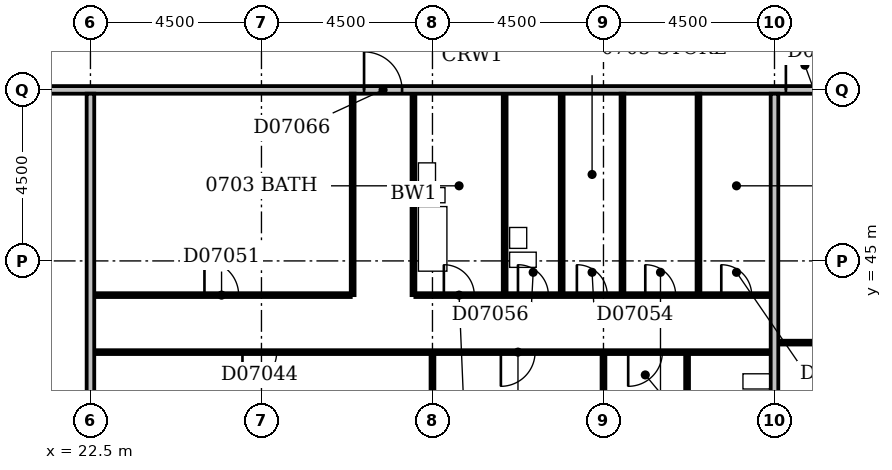
"""IFC4 building model, lengths in metres.
Left out: names, types, materials, properties, quantities, classifications, styles, units other than length and angle.
Written with IfcOpenShell. Run it as: python <this file> out.ifc"""

import sys

from ifc_helpers import new_model, si_unit, direction, frame, frame_2d, origin, place, context, subcontext, project, spatial, rectangle, extrude, element, fill, save


model = new_model("IFC4")
c1 = context("Model", 3, precision=1e-05, world=origin(), true_north=direction((0.0, 1.0)))
c2 = subcontext(c1, "Body", "Model", "MODEL_VIEW")
j1 = project(units=[si_unit("LENGTHUNIT", "METRE"), si_unit("PLANEANGLEUNIT", "RADIAN")], contexts=[c1])
p1 = place(None, origin())
s1 = spatial("IfcSite", under=j1, at=p1, CompositionType="ELEMENT")
p2 = place(p1, origin())
s2 = spatial("IfcBuilding", under=s1, at=p2, CompositionType="ELEMENT")
p3 = place(p2, frame((0.0, 0.0, 36.2)))
s3 = spatial("IfcBuildingStorey", under=s2, at=p3, CompositionType="ELEMENT", Elevation=36.2)
p4 = place(p3, frame((22.5, 36.6, 0.0), z_axis=(0.0, 0.0, 1.0), x_axis=(0.0, 1.0, 0.0)))
e1 = element("IfcWall", 1, at=p4, inside=s3, PredefinedType="PARTITIONING", context=c2, shape_type="SweptSolid", body=[
    extrude(rectangle(XDim=12.8, YDim=0.2, at=frame_2d((6.4, 0.0))), origin(), (0.0, 0.0, 1.0), 3.3),
])
p5 = place(p3, frame((31.5, 36.6, 0.0), z_axis=(0.0, 0.0, 1.0), x_axis=(0.0, 1.0, 0.0)))
e2 = element("IfcWall", 2, at=p5, inside=s3, PredefinedType="PARTITIONING", context=c2, shape_type="SweptSolid", body=[
    extrude(rectangle(XDim=5.95, YDim=0.1, at=frame_2d((2.975, 0.0))), origin(), (0.0, 0.0, 1.0), 3.3),
])
p6 = place(p3, frame((36.0, 36.6, 0.0), z_axis=(0.0, 0.0, 1.0), x_axis=(0.0, 1.0, 0.0)))
e3 = element("IfcWall", 3, at=p6, inside=s3, PredefinedType="PARTITIONING", context=c2, shape_type="SweptSolid", body=[
    extrude(rectangle(XDim=5.95, YDim=0.1, at=frame_2d((2.975, 0.0))), origin(), (0.0, 0.0, 1.0), 2.4),
])
p7 = place(p3, frame((40.5, 36.6, 0.0), z_axis=(0.0, 0.0, 1.0), x_axis=(0.0, 1.0, 0.0)))
e4 = element("IfcWall", 4, at=p7, inside=s3, PredefinedType="PARTITIONING", context=c2, shape_type="SweptSolid", body=[
    extrude(rectangle(XDim=12.8, YDim=0.2, at=frame_2d((6.4, 0.0))), origin(), (0.0, 0.0, 1.0), 3.3),
])
p8 = place(p3, frame((38.2, 39.7, 0.0), z_axis=(0.0, 0.0, 1.0), x_axis=(0.0, 1.0, 0.0)))
e5 = element("IfcWall", 5, at=p8, inside=s3, PredefinedType="PLUMBINGWALL", context=c2, shape_type="SweptSolid", body=[
    extrude(rectangle(XDim=2.85, YDim=0.1, at=frame_2d((1.425, 0.0))), origin(), (0.0, 0.0, 1.0), 3.3),
])
p9 = place(p8, frame((1.05, 0.0, 0.0)))
e6 = element("IfcOpeningElement", 6, at=p9, cuts=e5, PredefinedType="OPENING", context=c2, shape_type="SweptSolid", body=[
    extrude(rectangle(XDim=0.8, YDim=2.1, at=frame_2d((0.4, 1.05))), frame((0.0, 0.062, 0.0), z_axis=(0.0, -1.0, 0.0), x_axis=(1.0, 0.0, 0.0)), (0.0, 0.0, 1.0), 0.124),
])
p10 = place(p3, frame((22.6, 42.6, 0.0), z_axis=(0.0, 0.0, 1.0), x_axis=(1.0, 0.0, 0.0)))
e7 = element("IfcWall", 7, at=p10, inside=s3, PredefinedType="PARTITIONING", context=c2, shape_type="SweptSolid", body=[
    extrude(rectangle(XDim=17.8, YDim=0.1, at=frame_2d((8.9, 0.0))), origin(), (0.0, 0.0, 1.0), 3.3),
])
p11 = place(p10, frame((3.9, 0.0, 0.0)))
e8 = element("IfcOpeningElement", 8, at=p11, cuts=e7, PredefinedType="OPENING", context=c2, shape_type="SweptSolid", body=[
    extrude(rectangle(XDim=0.9, YDim=2.1, at=frame_2d((0.45, 1.05))), frame((0.0, 0.062, 0.0), z_axis=(0.0, -1.0, 0.0), x_axis=(1.0, 0.0, 0.0)), (0.0, 0.0, 1.0), 0.124),
])
p12 = place(p10, frame((10.7, 0.0, 0.0)))
e9 = element("IfcOpeningElement", 9, at=p12, cuts=e7, PredefinedType="OPENING", context=c2, shape_type="SweptSolid", body=[
    extrude(rectangle(XDim=0.9, YDim=2.1, at=frame_2d((0.45, 1.05))), frame((0.0, 0.062, 0.0), z_axis=(0.0, -1.0, 0.0), x_axis=(1.0, 0.0, 0.0)), (0.0, 0.0, 1.0), 0.124),
])
p13 = place(p10, frame((14.05, 0.0, 0.0)))
e10 = element("IfcOpeningElement", 10, at=p13, cuts=e7, PredefinedType="OPENING", context=c2, shape_type="SweptSolid", body=[
    extrude(rectangle(XDim=0.9, YDim=2.1, at=frame_2d((0.45, 1.05))), frame((0.0, 0.062, 0.0), z_axis=(0.0, -1.0, 0.0), x_axis=(1.0, 0.0, 0.0)), (0.0, 0.0, 1.0), 0.124),
])
p14 = place(p3, frame((40.6, 42.85, 0.0), z_axis=(0.0, 0.0, 1.0), x_axis=(1.0, 0.0, 0.0)))
e11 = element("IfcWall", 11, at=p14, inside=s3, PredefinedType="PARTITIONING", context=c2, shape_type="SweptSolid", body=[
    extrude(rectangle(XDim=13.3, YDim=0.1, at=frame_2d((6.65, 0.0))), origin(), (0.0, 0.0, 1.0), 3.3),
])
p15 = place(p14, frame((3.9, 0.0, 0.0)))
e12 = element("IfcOpeningElement", 12, at=p15, cuts=e11, PredefinedType="OPENING", context=c2, shape_type="SweptSolid", body=[
    extrude(rectangle(XDim=0.9, YDim=2.1, at=frame_2d((0.45, 1.05))), frame((0.0, 0.062, 0.0), z_axis=(0.0, -1.0, 0.0), x_axis=(1.0, 0.0, 0.0)), (0.0, 0.0, 1.0), 0.124),
])
p16 = place(p14, frame((10.7, 0.0, 0.0)))
e13 = element("IfcOpeningElement", 13, at=p16, cuts=e11, PredefinedType="OPENING", context=c2, shape_type="SweptSolid", body=[
    extrude(rectangle(XDim=0.9, YDim=2.1, at=frame_2d((0.45, 1.05))), frame((0.0, 0.062, 0.0), z_axis=(0.0, -1.0, 0.0), x_axis=(1.0, 0.0, 0.0)), (0.0, 0.0, 1.0), 0.124),
])
p17 = place(p3, frame((22.6, 44.1, 0.0), z_axis=(0.0, 0.0, 1.0), x_axis=(1.0, 0.0, 0.0)))
e14 = element("IfcWall", 14, at=p17, inside=s3, PredefinedType="PARTITIONING", context=c2, shape_type="SweptSolid", body=[
    extrude(rectangle(XDim=6.75, YDim=0.1, at=frame_2d((3.375, 0.0))), origin(), (0.0, 0.0, 1.0), 3.3),
])
p18 = place(p17, frame((2.9, 0.0, 0.0)))
e15 = element("IfcOpeningElement", 15, at=p18, cuts=e14, PredefinedType="OPENING", context=c2, shape_type="SweptSolid", body=[
    extrude(rectangle(XDim=0.9, YDim=2.1, at=frame_2d((0.45, 1.05))), frame((0.0, 0.062, 0.0), z_axis=(0.0, -1.0, 0.0), x_axis=(1.0, 0.0, 0.0)), (0.0, 0.0, 1.0), 0.124),
])
p19 = place(p3, frame((29.4, 44.1, 0.0), z_axis=(0.0, 0.0, 1.0), x_axis=(0.0, 1.0, 0.0)))
e16 = element("IfcWall", 16, at=p19, inside=s3, PredefinedType="PARTITIONING", context=c2, shape_type="SweptSolid", body=[
    extrude(rectangle(XDim=5.3, YDim=0.1, at=frame_2d((2.65, 0.0))), origin(), (0.0, 0.0, 1.0), 3.3),
])
p20 = place(p3, frame((31.0, 44.1, 0.0), z_axis=(0.0, 0.0, 1.0), x_axis=(0.0, 1.0, 0.0)))
e17 = element("IfcWall", 17, at=p20, inside=s3, PredefinedType="PLUMBINGWALL", context=c2, shape_type="SweptSolid", body=[
    extrude(rectangle(XDim=5.3, YDim=0.1, at=frame_2d((2.65, 0.0))), origin(), (0.0, 0.0, 1.0), 3.3),
])
p21 = place(p3, frame((31.05, 44.1, 0.0), z_axis=(0.0, 0.0, 1.0), x_axis=(1.0, 0.0, 0.0)))
e18 = element("IfcWall", 18, at=p21, inside=s3, PredefinedType="PARTITIONING", context=c2, shape_type="SweptSolid", body=[
    extrude(rectangle(XDim=9.35, YDim=0.1, at=frame_2d((4.675, 0.0))), origin(), (0.0, 0.0, 1.0), 3.3),
])
p22 = place(p21, frame((0.75, 0.0, 0.0)))
e19 = element("IfcOpeningElement", 19, at=p22, cuts=e18, PredefinedType="OPENING", context=c2, shape_type="SweptSolid", body=[
    extrude(rectangle(XDim=0.8, YDim=2.1, at=frame_2d((0.4, 1.05))), frame((0.0, 0.062, 0.0), z_axis=(0.0, -1.0, 0.0), x_axis=(1.0, 0.0, 0.0)), (0.0, 0.0, 1.0), 0.124),
])
p23 = place(p21, frame((8.05, 0.0, 0.0)))
e20 = element("IfcOpeningElement", 20, at=p23, cuts=e18, PredefinedType="OPENING", context=c2, shape_type="SweptSolid", body=[
    extrude(rectangle(XDim=0.8, YDim=2.1, at=frame_2d((0.4, 1.05))), frame((0.0, 0.062, 0.0), z_axis=(0.0, -1.0, 0.0), x_axis=(1.0, 0.0, 0.0)), (0.0, 0.0, 1.0), 0.124),
])
p24 = place(p21, frame((4.25, 0.0, 0.0)))
e21 = element("IfcOpeningElement", 21, at=p24, cuts=e18, PredefinedType="OPENING", context=c2, shape_type="SweptSolid", body=[
    extrude(rectangle(XDim=0.8, YDim=2.1, at=frame_2d((0.4, 1.05))), frame((0.0, 0.062, 0.0), z_axis=(0.0, -1.0, 0.0), x_axis=(1.0, 0.0, 0.0)), (0.0, 0.0, 1.0), 0.124),
])
p25 = place(p21, frame((6.05, 0.0, 0.0)))
e22 = element("IfcOpeningElement", 22, at=p25, cuts=e18, PredefinedType="OPENING", context=c2, shape_type="SweptSolid", body=[
    extrude(rectangle(XDim=0.8, YDim=2.1, at=frame_2d((0.4, 1.05))), frame((0.0, 0.062, 0.0), z_axis=(0.0, -1.0, 0.0), x_axis=(1.0, 0.0, 0.0)), (0.0, 0.0, 1.0), 0.124),
])
p26 = place(p21, frame((2.7, 0.0, 0.0)))
e23 = element("IfcOpeningElement", 23, at=p26, cuts=e18, PredefinedType="OPENING", context=c2, shape_type="SweptSolid", body=[
    extrude(rectangle(XDim=0.8, YDim=2.1, at=frame_2d((0.4, 1.05))), frame((0.0, 0.062, 0.0), z_axis=(0.0, -1.0, 0.0), x_axis=(1.0, 0.0, 0.0)), (0.0, 0.0, 1.0), 0.124),
])
for number, where, z_axis, x_axis in (
    (24, (33.4, 44.15, 0.0), (0.0, 0.0, 1.0), (0.0, 1.0, 0.0)),
    (25, (34.9, 44.15, 0.0), (0.0, 0.0, 1.0), (0.0, 1.0, 0.0)),
):
    element("IfcWall", number, at=place(p3, frame(where, z_axis=z_axis, x_axis=x_axis)), inside=s3, PredefinedType="PLUMBINGWALL", context=c2, shape_type="SweptSolid", body=[
        extrude(rectangle(XDim=5.25, YDim=0.1, at=frame_2d((2.625, 0.0))), origin(), (0.0, 0.0, 1.0), 3.3),
    ])
p27 = place(p3, frame((36.5, 44.15, 0.0), z_axis=(0.0, 0.0, 1.0), x_axis=(0.0, 1.0, 0.0)))
e26 = element("IfcWall", 26, at=p27, inside=s3, PredefinedType="PARTITIONING", context=c2, shape_type="SweptSolid", body=[
    extrude(rectangle(XDim=5.25, YDim=0.1, at=frame_2d((2.625, 0.0))), origin(), (0.0, 0.0, 1.0), 2.4),
])
p28 = place(p3, frame((38.5, 44.15, 0.0), z_axis=(0.0, 0.0, 1.0), x_axis=(0.0, 1.0, 0.0)))
e27 = element("IfcWall", 27, at=p28, inside=s3, PredefinedType="PARTITIONING", context=c2, shape_type="SweptSolid", body=[
    extrude(rectangle(XDim=5.25, YDim=0.1, at=frame_2d((2.625, 0.0))), origin(), (0.0, 0.0, 1.0), 3.3),
])
p29 = place(p3, frame((9.1, 49.5, 0.0), z_axis=(0.0, 0.0, 1.0), x_axis=(1.0, 0.0, 0.0)))
e28 = element("IfcWall", 28, at=p29, inside=s3, PredefinedType="PARTITIONING", context=c2, shape_type="SweptSolid", body=[
    extrude(rectangle(XDim=57.8, YDim=0.2, at=frame_2d((28.9, 0.0))), origin(), (0.0, 0.0, 1.0), 3.3),
])
p30 = place(p29, frame((20.6, 0.0, 0.0)))
e29 = element("IfcOpeningElement", 29, at=p30, cuts=e28, PredefinedType="OPENING", context=c2, shape_type="SweptSolid", body=[
    extrude(rectangle(XDim=1.0, YDim=2.1, at=frame_2d((0.5, 1.05))), frame((0.0, 0.112, 0.0), z_axis=(0.0, -1.0, 0.0), x_axis=(1.0, 0.0, 0.0)), (0.0, 0.0, 1.0), 0.224),
])
p31 = place(p29, frame((31.7, 0.0, 0.0)))
e30 = element("IfcOpeningElement", 30, at=p31, cuts=e28, PredefinedType="OPENING", context=c2, shape_type="SweptSolid", body=[
    extrude(rectangle(XDim=1.0, YDim=2.1, at=frame_2d((0.5, 1.05))), frame((0.0, 0.112, 0.0), z_axis=(0.0, -1.0, 0.0), x_axis=(1.0, 0.0, 0.0)), (0.0, 0.0, 1.0), 0.224),
])
p32 = place(p29, frame((47.6, 0.0, 0.0)))
e31 = element("IfcOpeningElement", 31, at=p32, cuts=e28, PredefinedType="OPENING", context=c2, shape_type="SweptSolid", body=[
    extrude(rectangle(XDim=1.0, YDim=2.1, at=frame_2d((0.5, 1.05))), frame((0.0, 0.112, 0.0), z_axis=(0.0, -1.0, 0.0), x_axis=(1.0, 0.0, 0.0)), (0.0, 0.0, 1.0), 0.224),
])
p33 = place(p29, frame((54.15, 0.0, 0.0)))
e32 = element("IfcOpeningElement", 32, at=p33, cuts=e28, PredefinedType="OPENING", context=c2, shape_type="SweptSolid", body=[
    extrude(rectangle(XDim=1.0, YDim=2.1, at=frame_2d((0.5, 1.05))), frame((0.0, 0.112, 0.0), z_axis=(0.0, -1.0, 0.0), x_axis=(1.0, 0.0, 0.0)), (0.0, 0.0, 1.0), 0.224),
])
p34 = place(p29, frame((10.65, 0.0, 0.0)))
e33 = element("IfcOpeningElement", 33, at=p34, cuts=e28, PredefinedType="OPENING", context=c2, shape_type="SweptSolid", body=[
    extrude(rectangle(XDim=0.9, YDim=2.1, at=frame_2d((0.45, 1.05))), frame((0.0, 0.112, 0.0), z_axis=(0.0, -1.0, 0.0), x_axis=(1.0, 0.0, 0.0)), (0.0, 0.0, 1.0), 0.224),
])
p35 = place(p11, frame((0.9, 0.0, 0.0), z_axis=(0.0, 0.0, 1.0), x_axis=(-1.0, 0.0, 0.0)))
e34 = element("IfcDoor", 34, at=p35, inside=s3, OperationType="SINGLE_SWING_RIGHT", PredefinedType="DOOR", context=c2, shape_type="SweptSolid", body=[
    extrude(rectangle(XDim=0.9, YDim=2.1, at=frame_2d((0.45, 1.05))), frame((0.0, 0.025, 0.0), z_axis=(0.0, -1.0, 0.0), x_axis=(1.0, 0.0, 0.0)), (0.0, 0.0, 1.0), 0.05),
])
fill(e8, e34)
p36 = place(p12, frame((0.9, 0.0, 0.0), z_axis=(0.0, 0.0, 1.0), x_axis=(-1.0, 0.0, 0.0)))
e35 = element("IfcDoor", 35, at=p36, inside=s3, OperationType="SINGLE_SWING_RIGHT", PredefinedType="DOOR", context=c2, shape_type="SweptSolid", body=[
    extrude(rectangle(XDim=0.9, YDim=2.1, at=frame_2d((0.45, 1.05))), frame((0.0, 0.025, 0.0), z_axis=(0.0, -1.0, 0.0), x_axis=(1.0, 0.0, 0.0)), (0.0, 0.0, 1.0), 0.05),
])
fill(e9, e35)
p37 = place(p13, frame((0.9, 0.0, 0.0), z_axis=(0.0, 0.0, 1.0), x_axis=(-1.0, 0.0, 0.0)))
e36 = element("IfcDoor", 36, at=p37, inside=s3, OperationType="SINGLE_SWING_RIGHT", PredefinedType="DOOR", context=c2, shape_type="SweptSolid", body=[
    extrude(rectangle(XDim=0.9, YDim=2.1, at=frame_2d((0.45, 1.05))), frame((0.0, 0.025, 0.0), z_axis=(0.0, -1.0, 0.0), x_axis=(1.0, 0.0, 0.0)), (0.0, 0.0, 1.0), 0.05),
])
fill(e10, e36)
p38 = place(p18, origin())
e37 = element("IfcDoor", 37, at=p38, inside=s3, OperationType="SINGLE_SWING_LEFT", PredefinedType="DOOR", context=c2, shape_type="SweptSolid", body=[
    extrude(rectangle(XDim=0.9, YDim=2.1, at=frame_2d((0.45, 1.05))), frame((0.0, 0.025, 0.0), z_axis=(0.0, -1.0, 0.0), x_axis=(1.0, 0.0, 0.0)), (0.0, 0.0, 1.0), 0.05),
])
fill(e15, e37)
p39 = place(p22, origin())
e38 = element("IfcDoor", 38, at=p39, inside=s3, OperationType="SINGLE_SWING_LEFT", PredefinedType="DOOR", context=c2, shape_type="SweptSolid", body=[
    extrude(rectangle(XDim=0.8, YDim=2.1, at=frame_2d((0.4, 1.05))), frame((0.0, 0.025, 0.0), z_axis=(0.0, -1.0, 0.0), x_axis=(1.0, 0.0, 0.0)), (0.0, 0.0, 1.0), 0.05),
])
fill(e19, e38)
p40 = place(p23, origin())
e39 = element("IfcDoor", 39, at=p40, inside=s3, OperationType="SINGLE_SWING_LEFT", PredefinedType="DOOR", context=c2, shape_type="SweptSolid", body=[
    extrude(rectangle(XDim=0.8, YDim=2.1, at=frame_2d((0.4, 1.05))), frame((0.0, 0.025, 0.0), z_axis=(0.0, -1.0, 0.0), x_axis=(1.0, 0.0, 0.0)), (0.0, 0.0, 1.0), 0.05),
])
fill(e20, e39)
p41 = place(p24, origin())
e40 = element("IfcDoor", 40, at=p41, inside=s3, OperationType="SINGLE_SWING_LEFT", PredefinedType="DOOR", context=c2, shape_type="SweptSolid", body=[
    extrude(rectangle(XDim=0.8, YDim=2.1, at=frame_2d((0.4, 1.05))), frame((0.0, 0.025, 0.0), z_axis=(0.0, -1.0, 0.0), x_axis=(1.0, 0.0, 0.0)), (0.0, 0.0, 1.0), 0.05),
])
fill(e21, e40)
p42 = place(p25, origin())
e41 = element("IfcDoor", 41, at=p42, inside=s3, OperationType="SINGLE_SWING_LEFT", PredefinedType="DOOR", context=c2, shape_type="SweptSolid", body=[
    extrude(rectangle(XDim=0.8, YDim=2.1, at=frame_2d((0.4, 1.05))), frame((0.0, 0.025, 0.0), z_axis=(0.0, -1.0, 0.0), x_axis=(1.0, 0.0, 0.0)), (0.0, 0.0, 1.0), 0.05),
])
fill(e22, e41)
p43 = place(p26, origin())
e42 = element("IfcDoor", 42, at=p43, inside=s3, OperationType="SINGLE_SWING_LEFT", PredefinedType="DOOR", context=c2, shape_type="SweptSolid", body=[
    extrude(rectangle(XDim=0.8, YDim=2.1, at=frame_2d((0.4, 1.05))), frame((0.0, 0.025, 0.0), z_axis=(0.0, -1.0, 0.0), x_axis=(1.0, 0.0, 0.0)), (0.0, 0.0, 1.0), 0.05),
])
fill(e23, e42)
p44 = place(p30, origin())
e43 = element("IfcDoor", 43, at=p44, inside=s3, OperationType="SINGLE_SWING_LEFT", PredefinedType="DOOR", context=c2, shape_type="SweptSolid", body=[
    extrude(rectangle(XDim=1.0, YDim=2.1, at=frame_2d((0.5, 1.05))), frame((0.0, 0.025, 0.0), z_axis=(0.0, -1.0, 0.0), x_axis=(1.0, 0.0, 0.0)), (0.0, 0.0, 1.0), 0.05),
])
fill(e29, e43)
p45 = place(p31, origin())
e44 = element("IfcDoor", 44, at=p45, inside=s3, OperationType="SINGLE_SWING_LEFT", PredefinedType="DOOR", context=c2, shape_type="SweptSolid", body=[
    extrude(rectangle(XDim=1.0, YDim=2.1, at=frame_2d((0.5, 1.05))), frame((0.0, 0.025, 0.0), z_axis=(0.0, -1.0, 0.0), x_axis=(1.0, 0.0, 0.0)), (0.0, 0.0, 1.0), 0.05),
])
fill(e30, e44)
save(model, sys.argv[1])
